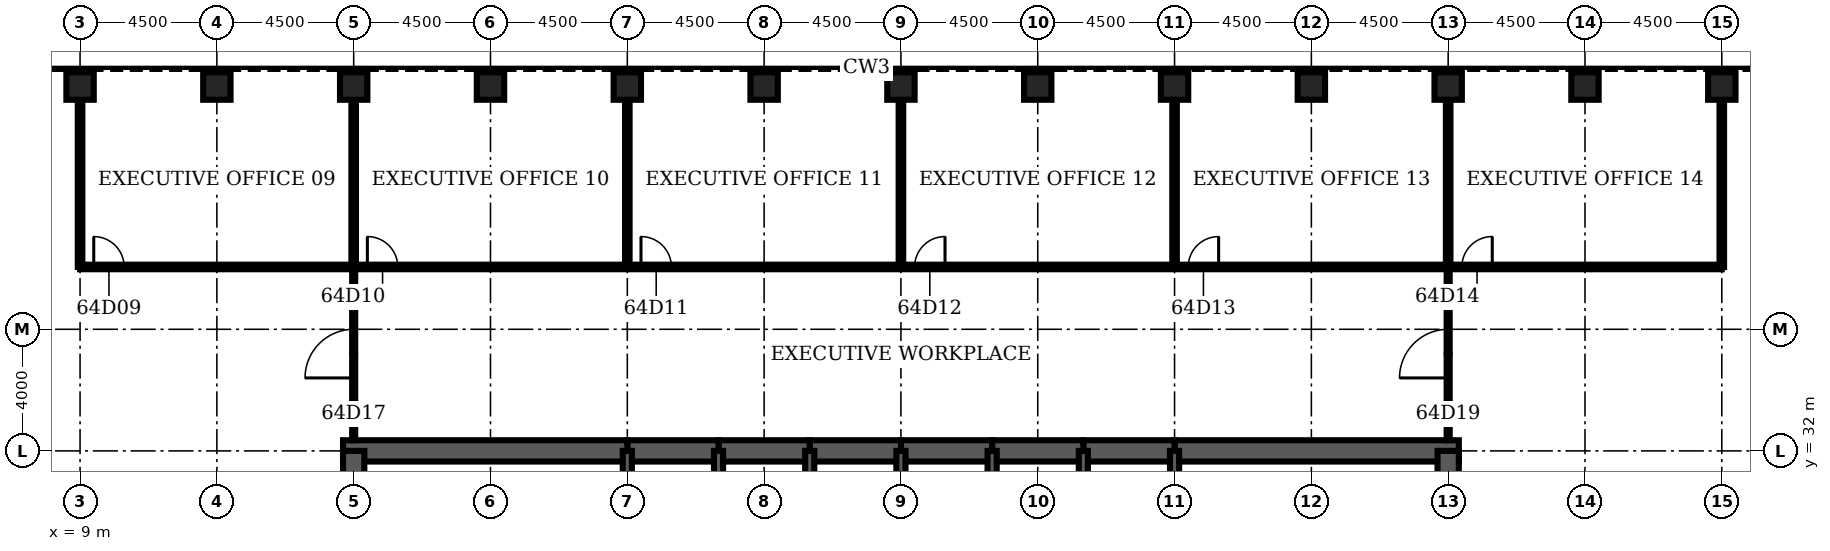
"""IFC4 building model, lengths in metres.
Left out: names, types, materials, properties, quantities, classifications, styles, units other than length and angle.
Written with IfcOpenShell. Run it as: python <this file> out.ifc"""

import sys

from ifc_helpers import new_model, si_unit, direction, frame, frame_2d, origin, origin_2d, place, context, subcontext, project, spatial, rectangle, hollow_rectangle, extrude, element, fill, save


model = new_model("IFC4")
c1 = context("Model", 3, precision=1e-05, world=origin(), true_north=direction((0.0, 1.0)))
c2 = subcontext(c1, "Body", "Model", "MODEL_VIEW")
j1 = project(units=[si_unit("LENGTHUNIT", "METRE"), si_unit("PLANEANGLEUNIT", "RADIAN")], contexts=[c1])
p1 = place(None, origin())
s1 = spatial("IfcSite", under=j1, at=p1, CompositionType="ELEMENT")
p2 = place(p1, origin())
s2 = spatial("IfcBuilding", under=s1, at=p2, CompositionType="ELEMENT")
p3 = place(p2, frame((0.0, 0.0, 283.7)))
s3 = spatial("IfcBuildingStorey", under=s2, at=p3, CompositionType="ELEMENT", Elevation=283.7)
for number, where, z_axis, x_axis in (
    (1, (63.0, 44.0, 0.0), (0.0, 0.0, 1.0), (0.0, 1.0, 0.0)),
    (2, (58.5, 44.0, 0.0), (0.0, 0.0, 1.0), (0.0, 1.0, 0.0)),
    (3, (54.0, 44.0, 0.0), (0.0, 0.0, 1.0), (0.0, 1.0, 0.0)),
    (4, (49.5, 44.0, 0.0), (0.0, 0.0, 1.0), (0.0, 1.0, 0.0)),
    (5, (45.0, 44.0, 0.0), (0.0, 0.0, 1.0), (0.0, 1.0, 0.0)),
    (6, (40.5, 44.0, 0.0), (0.0, 0.0, 1.0), (0.0, 1.0, 0.0)),
    (7, (36.0, 44.0, 0.0), (0.0, 0.0, 1.0), (0.0, 1.0, 0.0)),
    (8, (31.5, 44.0, 0.0), (0.0, 0.0, 1.0), (0.0, 1.0, 0.0)),
    (9, (27.0, 44.0, 0.0), (0.0, 0.0, 1.0), (0.0, 1.0, 0.0)),
    (10, (22.5, 44.0, 0.0), (0.0, 0.0, 1.0), (0.0, 1.0, 0.0)),
    (11, (18.0, 44.0, 0.0), (0.0, 0.0, 1.0), (0.0, 1.0, 0.0)),
    (12, (13.5, 44.0, 0.0), (0.0, 0.0, 1.0), (0.0, 1.0, 0.0)),
    (13, (9.0, 44.0, 0.0), (0.0, 0.0, 1.0), (0.0, 1.0, 0.0)),
):
    element("IfcColumn", number, at=place(p3, frame(where, z_axis=z_axis, x_axis=x_axis)), inside=s3, PredefinedType="COLUMN", context=c2, shape_type="SweptSolid", body=[
        extrude(hollow_rectangle(XDim=0.9, YDim=0.9, WallThickness=0.07, at=origin_2d()), origin(), (0.0, 0.0, 1.0), 4.2),
    ])
p4 = place(p3, frame((54.35, 32.0, 0.0), z_axis=(0.0, 0.0, 1.0), x_axis=(-1.0, 0.0, 0.0)))
e14 = element("IfcWall", 14, at=p4, inside=s3, PredefinedType="SHEAR", context=c2, shape_type="SweptSolid", body=[
    extrude(rectangle(XDim=9.35, YDim=0.7, at=frame_2d((4.675, 0.0))), origin(), (0.0, 0.0, 1.0), 4.2),
])
for number, where, z_axis, x_axis in (
    (15, (45.0, 32.0, 0.0), (0.0, 0.0, 1.0), (-1.0, 0.0, 0.0)),
    (16, (42.0, 32.0, 0.0), (0.0, 0.0, 1.0), (-1.0, 0.0, 0.0)),
    (17, (39.0, 32.0, 0.0), (0.0, 0.0, 1.0), (-1.0, 0.0, 0.0)),
    (18, (36.0, 32.0, 0.0), (0.0, 0.0, 1.0), (-1.0, 0.0, 0.0)),
    (19, (33.0, 32.0, 0.0), (0.0, 0.0, 1.0), (-1.0, 0.0, 0.0)),
    (20, (30.0, 32.0, 0.0), (0.0, 0.0, 1.0), (-1.0, 0.0, 0.0)),
):
    element("IfcWall", number, at=place(p3, frame(where, z_axis=z_axis, x_axis=x_axis)), inside=s3, PredefinedType="SHEAR", context=c2, shape_type="SweptSolid", body=[
        extrude(rectangle(XDim=3.0, YDim=0.7, at=frame_2d((1.5, 0.0))), origin(), (0.0, 0.0, 1.0), 4.2),
    ])
p5 = place(p3, frame((27.0, 32.0, 0.0), z_axis=(0.0, 0.0, 1.0), x_axis=(-1.0, 0.0, 0.0)))
e21 = element("IfcWall", 21, at=p5, inside=s3, PredefinedType="SHEAR", context=c2, shape_type="SweptSolid", body=[
    extrude(rectangle(XDim=9.35, YDim=0.7, at=frame_2d((4.675, 0.0))), origin(), (0.0, 0.0, 1.0), 4.2),
])
for number, where, z_axis, x_axis in (
    (22, (18.0, 32.0, 0.0), (0.0, 0.0, 1.0), (0.0, -1.0, 0.0)),
    (23, (54.0, 28.8, 0.0), (0.0, 0.0, 1.0), (0.0, 1.0, 0.0)),
):
    element("IfcWall", number, at=place(p3, frame(where, z_axis=z_axis, x_axis=x_axis)), inside=s3, PredefinedType="SHEAR", context=c2, shape_type="SweptSolid", body=[
        extrude(rectangle(XDim=3.2, YDim=0.7, at=frame_2d((1.6, 0.0))), origin(), (0.0, 0.0, 1.0), 4.2),
    ])
for number, where, z_axis, x_axis in (
    (24, (27.0, 28.8, 0.0), (0.0, 0.0, 1.0), (0.0, 1.0, 0.0)),
    (25, (30.0, 28.8, 0.0), (0.0, 0.0, 1.0), (0.0, 1.0, 0.0)),
    (26, (33.0, 28.8, 0.0), (0.0, 0.0, 1.0), (0.0, 1.0, 0.0)),
    (27, (36.0, 28.8, 0.0), (0.0, 0.0, 1.0), (0.0, 1.0, 0.0)),
    (28, (39.0, 28.8, 0.0), (0.0, 0.0, 1.0), (0.0, 1.0, 0.0)),
    (29, (42.0, 28.8, 0.0), (0.0, 0.0, 1.0), (0.0, 1.0, 0.0)),
    (30, (45.0, 28.8, 0.0), (0.0, 0.0, 1.0), (0.0, 1.0, 0.0)),
):
    element("IfcWall", number, at=place(p3, frame(where, z_axis=z_axis, x_axis=x_axis)), inside=s3, PredefinedType="SOLIDWALL", context=c2, shape_type="SweptSolid", body=[
        extrude(rectangle(XDim=3.2, YDim=0.3, at=frame_2d((1.6, 0.0))), origin(), (0.0, 0.0, 1.0), 4.2),
    ])
p6 = place(p3, frame((9.0, 38.05, 0.0), z_axis=(0.0, 0.0, 1.0), x_axis=(1.0, 0.0, 0.0)))
e31 = element("IfcWall", 31, at=p6, inside=s3, PredefinedType="PARTITIONING", context=c2, shape_type="SweptSolid", body=[
    extrude(rectangle(XDim=54.0, YDim=0.15, at=frame_2d((27.0, 0.0))), origin(), (0.0, 0.0, 1.0), 3.0),
])
p7 = place(p6, frame((0.45, 0.0, 0.0)))
e32 = element("IfcOpeningElement", 32, at=p7, cuts=e31, PredefinedType="OPENING", context=c2, shape_type="SweptSolid", body=[
    extrude(rectangle(XDim=1.0, YDim=2.1, at=frame_2d((0.5, 1.05))), frame((0.0, 0.085, 0.0), z_axis=(0.0, -1.0, 0.0), x_axis=(1.0, 0.0, 0.0)), (0.0, 0.0, 1.0), 0.17),
])
p8 = place(p6, frame((9.45, 0.0, 0.0)))
e33 = element("IfcOpeningElement", 33, at=p8, cuts=e31, PredefinedType="OPENING", context=c2, shape_type="SweptSolid", body=[
    extrude(rectangle(XDim=1.0, YDim=2.1, at=frame_2d((0.5, 1.05))), frame((0.0, 0.085, 0.0), z_axis=(0.0, -1.0, 0.0), x_axis=(1.0, 0.0, 0.0)), (0.0, 0.0, 1.0), 0.17),
])
p9 = place(p6, frame((18.45, 0.0, 0.0)))
e34 = element("IfcOpeningElement", 34, at=p9, cuts=e31, PredefinedType="OPENING", context=c2, shape_type="SweptSolid", body=[
    extrude(rectangle(XDim=1.0, YDim=2.1, at=frame_2d((0.5, 1.05))), frame((0.0, 0.085, 0.0), z_axis=(0.0, -1.0, 0.0), x_axis=(1.0, 0.0, 0.0)), (0.0, 0.0, 1.0), 0.17),
])
p10 = place(p6, frame((27.45, 0.0, 0.0)))
e35 = element("IfcOpeningElement", 35, at=p10, cuts=e31, PredefinedType="OPENING", context=c2, shape_type="SweptSolid", body=[
    extrude(rectangle(XDim=1.0, YDim=2.1, at=frame_2d((0.5, 1.05))), frame((0.0, 0.085, 0.0), z_axis=(0.0, -1.0, 0.0), x_axis=(1.0, 0.0, 0.0)), (0.0, 0.0, 1.0), 0.17),
])
p11 = place(p6, frame((36.45, 0.0, 0.0)))
e36 = element("IfcOpeningElement", 36, at=p11, cuts=e31, PredefinedType="OPENING", context=c2, shape_type="SweptSolid", body=[
    extrude(rectangle(XDim=1.0, YDim=2.1, at=frame_2d((0.5, 1.05))), frame((0.0, 0.085, 0.0), z_axis=(0.0, -1.0, 0.0), x_axis=(1.0, 0.0, 0.0)), (0.0, 0.0, 1.0), 0.17),
])
p12 = place(p6, frame((45.45, 0.0, 0.0)))
e37 = element("IfcOpeningElement", 37, at=p12, cuts=e31, PredefinedType="OPENING", context=c2, shape_type="SweptSolid", body=[
    extrude(rectangle(XDim=1.0, YDim=2.1, at=frame_2d((0.5, 1.05))), frame((0.0, 0.085, 0.0), z_axis=(0.0, -1.0, 0.0), x_axis=(1.0, 0.0, 0.0)), (0.0, 0.0, 1.0), 0.17),
])
p13 = place(p3, frame((9.0, 38.05, 0.0), z_axis=(0.0, 0.0, 1.0), x_axis=(0.0, 1.0, 0.0)))
e38 = element("IfcWall", 38, at=p13, inside=s3, PredefinedType="PARTITIONING", context=c2, shape_type="SweptSolid", body=[
    extrude(rectangle(XDim=5.5, YDim=0.15, at=frame_2d((2.75, 0.0))), origin(), (0.0, 0.0, 1.0), 3.0),
])
p14 = place(p3, frame((18.0, 32.35, 0.0), z_axis=(0.0, 0.0, 1.0), x_axis=(0.0, 1.0, 0.0)))
e39 = element("IfcWall", 39, at=p14, inside=s3, PredefinedType="PARTITIONING", context=c2, shape_type="SweptSolid", body=[
    extrude(rectangle(XDim=5.7, YDim=0.1, at=frame_2d((2.85, 0.0))), origin(), (0.0, 0.0, 1.0), 3.0),
])
p15 = place(p14, frame((2.05, 0.0, 0.0)))
e40 = element("IfcOpeningElement", 40, at=p15, cuts=e39, PredefinedType="OPENING", context=c2, shape_type="SweptSolid", body=[
    extrude(rectangle(XDim=1.6, YDim=2.1, at=frame_2d((0.8, 1.05))), frame((0.0, 0.06, 0.0), z_axis=(0.0, -1.0, 0.0), x_axis=(1.0, 0.0, 0.0)), (0.0, 0.0, 1.0), 0.12),
])
for number, where, z_axis, x_axis in (
    (41, (18.0, 38.05, 0.0), (0.0, 0.0, 1.0), (0.0, 1.0, 0.0)),
    (42, (27.0, 38.05, 0.0), (0.0, 0.0, 1.0), (0.0, 1.0, 0.0)),
    (43, (36.0, 38.05, 0.0), (0.0, 0.0, 1.0), (0.0, 1.0, 0.0)),
    (44, (45.0, 38.05, 0.0), (0.0, 0.0, 1.0), (0.0, 1.0, 0.0)),
):
    element("IfcWall", number, at=place(p3, frame(where, z_axis=z_axis, x_axis=x_axis)), inside=s3, PredefinedType="PARTITIONING", context=c2, shape_type="SweptSolid", body=[
        extrude(rectangle(XDim=5.5, YDim=0.15, at=frame_2d((2.75, 0.0))), origin(), (0.0, 0.0, 1.0), 3.0),
    ])
p16 = place(p3, frame((54.0, 32.35, 0.0), z_axis=(0.0, 0.0, 1.0), x_axis=(0.0, 1.0, 0.0)))
e45 = element("IfcWall", 45, at=p16, inside=s3, PredefinedType="PARTITIONING", context=c2, shape_type="SweptSolid", body=[
    extrude(rectangle(XDim=5.7, YDim=0.1, at=frame_2d((2.85, 0.0))), origin(), (0.0, 0.0, 1.0), 3.0),
])
p17 = place(p16, frame((2.05, 0.0, 0.0)))
e46 = element("IfcOpeningElement", 46, at=p17, cuts=e45, PredefinedType="OPENING", context=c2, shape_type="SweptSolid", body=[
    extrude(rectangle(XDim=1.6, YDim=2.1, at=frame_2d((0.8, 1.05))), frame((0.0, 0.06, 0.0), z_axis=(0.0, -1.0, 0.0), x_axis=(1.0, 0.0, 0.0)), (0.0, 0.0, 1.0), 0.12),
])
for number, where, z_axis, x_axis in (
    (47, (54.0, 38.05, 0.0), (0.0, 0.0, 1.0), (0.0, 1.0, 0.0)),
    (48, (63.0, 38.05, 0.0), (0.0, 0.0, 1.0), (0.0, 1.0, 0.0)),
):
    element("IfcWall", number, at=place(p3, frame(where, z_axis=z_axis, x_axis=x_axis)), inside=s3, PredefinedType="PARTITIONING", context=c2, shape_type="SweptSolid", body=[
        extrude(rectangle(XDim=5.5, YDim=0.15, at=frame_2d((2.75, 0.0))), origin(), (0.0, 0.0, 1.0), 3.0),
    ])
p18 = place(p7, origin())
e49 = element("IfcDoor", 49, at=p18, inside=s3, OperationType="SINGLE_SWING_LEFT", PredefinedType="DOOR", context=c2, shape_type="SweptSolid", body=[
    extrude(rectangle(XDim=1.0, YDim=2.1, at=frame_2d((0.5, 1.05))), frame((0.0, 0.025, 0.0), z_axis=(0.0, -1.0, 0.0), x_axis=(1.0, 0.0, 0.0)), (0.0, 0.0, 1.0), 0.05),
])
fill(e32, e49)
p19 = place(p8, origin())
e50 = element("IfcDoor", 50, at=p19, inside=s3, OperationType="SINGLE_SWING_LEFT", PredefinedType="DOOR", context=c2, shape_type="SweptSolid", body=[
    extrude(rectangle(XDim=1.0, YDim=2.1, at=frame_2d((0.5, 1.05))), frame((0.0, 0.025, 0.0), z_axis=(0.0, -1.0, 0.0), x_axis=(1.0, 0.0, 0.0)), (0.0, 0.0, 1.0), 0.05),
])
fill(e33, e50)
p20 = place(p9, origin())
e51 = element("IfcDoor", 51, at=p20, inside=s3, OperationType="SINGLE_SWING_LEFT", PredefinedType="DOOR", context=c2, shape_type="SweptSolid", body=[
    extrude(rectangle(XDim=1.0, YDim=2.1, at=frame_2d((0.5, 1.05))), frame((0.0, 0.025, 0.0), z_axis=(0.0, -1.0, 0.0), x_axis=(1.0, 0.0, 0.0)), (0.0, 0.0, 1.0), 0.05),
])
fill(e34, e51)
p21 = place(p10, origin())
e52 = element("IfcDoor", 52, at=p21, inside=s3, OperationType="SINGLE_SWING_RIGHT", PredefinedType="DOOR", context=c2, shape_type="SweptSolid", body=[
    extrude(rectangle(XDim=1.0, YDim=2.1, at=frame_2d((0.5, 1.05))), frame((0.0, 0.025, 0.0), z_axis=(0.0, -1.0, 0.0), x_axis=(1.0, 0.0, 0.0)), (0.0, 0.0, 1.0), 0.05),
])
fill(e35, e52)
p22 = place(p11, origin())
e53 = element("IfcDoor", 53, at=p22, inside=s3, OperationType="SINGLE_SWING_RIGHT", PredefinedType="DOOR", context=c2, shape_type="SweptSolid", body=[
    extrude(rectangle(XDim=1.0, YDim=2.1, at=frame_2d((0.5, 1.05))), frame((0.0, 0.025, 0.0), z_axis=(0.0, -1.0, 0.0), x_axis=(1.0, 0.0, 0.0)), (0.0, 0.0, 1.0), 0.05),
])
fill(e36, e53)
p23 = place(p12, origin())
e54 = element("IfcDoor", 54, at=p23, inside=s3, OperationType="SINGLE_SWING_RIGHT", PredefinedType="DOOR", context=c2, shape_type="SweptSolid", body=[
    extrude(rectangle(XDim=1.0, YDim=2.1, at=frame_2d((0.5, 1.05))), frame((0.0, 0.025, 0.0), z_axis=(0.0, -1.0, 0.0), x_axis=(1.0, 0.0, 0.0)), (0.0, 0.0, 1.0), 0.05),
])
fill(e37, e54)
p24 = place(p15, origin())
e55 = element("IfcDoor", 55, at=p24, inside=s3, OperationType="SINGLE_SWING_LEFT", PredefinedType="DOOR", context=c2, shape_type="SweptSolid", body=[
    extrude(rectangle(XDim=1.6, YDim=2.1, at=frame_2d((0.8, 1.05))), frame((0.0, 0.025, 0.0), z_axis=(0.0, -1.0, 0.0), x_axis=(1.0, 0.0, 0.0)), (0.0, 0.0, 1.0), 0.05),
])
fill(e40, e55)
p25 = place(p17, origin())
e56 = element("IfcDoor", 56, at=p25, inside=s3, OperationType="SINGLE_SWING_LEFT", PredefinedType="DOOR", context=c2, shape_type="SweptSolid", body=[
    extrude(rectangle(XDim=1.6, YDim=2.1, at=frame_2d((0.8, 1.05))), frame((0.0, 0.025, 0.0), z_axis=(0.0, -1.0, 0.0), x_axis=(1.0, 0.0, 0.0)), (0.0, 0.0, 1.0), 0.05),
])
fill(e46, e56)
save(model, sys.argv[1])
